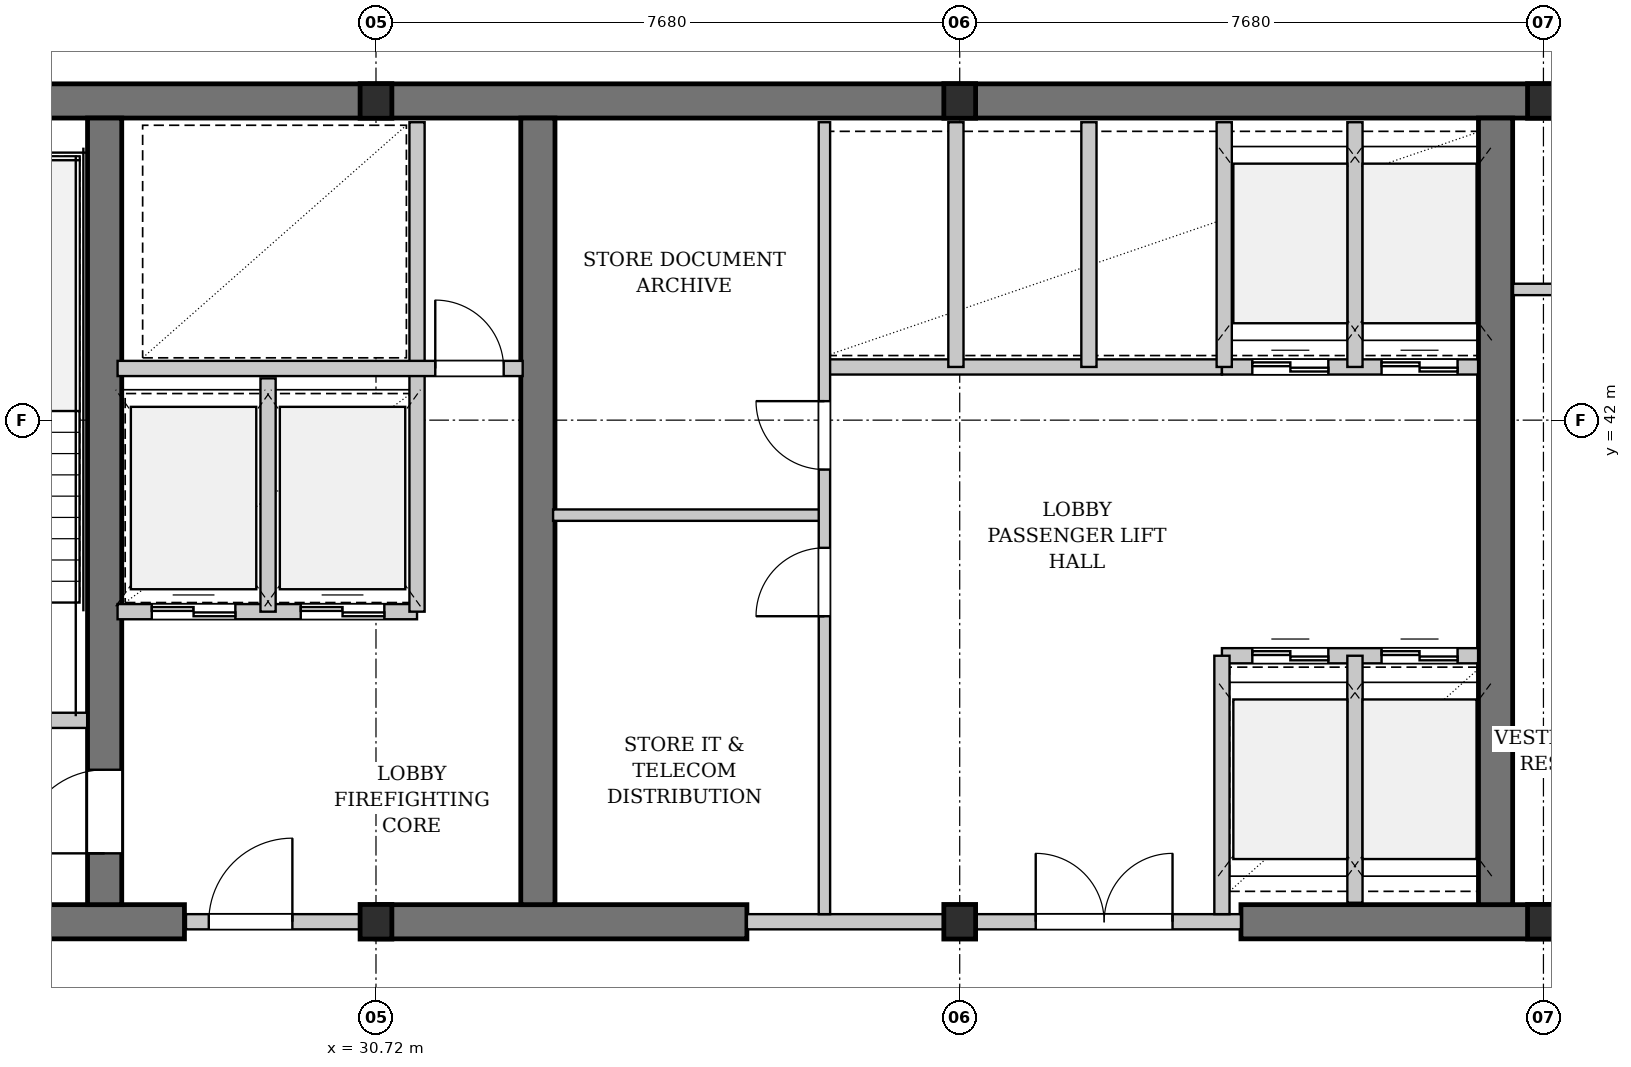
"""IFC4 building model, lengths in metres.
Left out: names, types, materials, properties, quantities, classifications, styles, units other than length and angle.
Written with IfcOpenShell. Run it as: python <this file> out.ifc"""

import sys

from ifc_helpers import new_model, si_unit, direction, frame, frame_2d, origin, origin_2d, place, context, subcontext, project, spatial, rectangle, i_section, extrude, element, fill, save


model = new_model("IFC4")
c1 = context("Model", 3, precision=1e-05, world=origin(), true_north=direction((0.0, 1.0)))
c2 = subcontext(c1, "Body", "Model", "MODEL_VIEW")
j1 = project(units=[si_unit("LENGTHUNIT", "METRE"), si_unit("PLANEANGLEUNIT", "RADIAN")], contexts=[c1])
p1 = place(None, origin())
s1 = spatial("IfcSite", under=j1, at=p1, CompositionType="ELEMENT")
p2 = place(p1, origin())
s2 = spatial("IfcBuilding", under=s1, at=p2, CompositionType="ELEMENT")
p3 = place(p2, frame((0.0, 0.0, 165.5)))
s3 = spatial("IfcBuildingStorey", under=s2, at=p3, CompositionType="ELEMENT", Elevation=165.5)
p4 = place(p3, frame((22.815, 46.2, 0.0), z_axis=(0.0, 0.0, 1.0), x_axis=(1.0, 0.0, 0.0)))
e1 = element("IfcWall", 1, at=p4, inside=s3, PredefinedType="SHEAR", context=c2, shape_type="SweptSolid", body=[
    extrude(rectangle(XDim=31.17, YDim=0.45, at=frame_2d((15.585, 0.0))), origin(), (0.0, 0.0, 1.0), 3.08),
])
p5 = place(p3, frame((22.815, 35.4, 0.0), z_axis=(0.0, 0.0, 1.0), x_axis=(1.0, 0.0, 0.0)))
e2 = element("IfcWall", 2, at=p5, inside=s3, PredefinedType="SHEAR", context=c2, shape_type="SweptSolid", body=[
    extrude(rectangle(XDim=5.385, YDim=0.45, at=frame_2d((2.692, 0.0))), origin(), (0.0, 0.0, 1.0), 3.08),
])
p6 = place(p3, frame((30.72, 35.4, 0.0), z_axis=(0.0, 0.0, 1.0), x_axis=(1.0, 0.0, 0.0)))
e3 = element("IfcWall", 3, at=p6, inside=s3, PredefinedType="SHEAR", context=c2, shape_type="SweptSolid", body=[
    extrude(rectangle(XDim=4.88, YDim=0.45, at=frame_2d((2.44, 0.0))), origin(), (0.0, 0.0, 1.0), 3.08),
])
p7 = place(p3, frame((42.1, 35.4, 0.0), z_axis=(0.0, 0.0, 1.0), x_axis=(1.0, 0.0, 0.0)))
e4 = element("IfcWall", 4, at=p7, inside=s3, PredefinedType="SHEAR", context=c2, shape_type="SweptSolid", body=[
    extrude(rectangle(XDim=8.05, YDim=0.45, at=frame_2d((4.025, 0.0))), origin(), (0.0, 0.0, 1.0), 3.08),
])
p8 = place(p7, frame((4.85, 0.0, 0.0)))
e5 = element("IfcOpeningElement", 5, at=p8, cuts=e4, PredefinedType="OPENING", context=c2, shape_type="SweptSolid", body=[
    extrude(rectangle(XDim=0.9, YDim=2.15, at=frame_2d((0.45, 1.075))), frame((0.0, 0.235, 0.0), z_axis=(0.0, -1.0, 0.0), x_axis=(1.0, 0.0, 0.0)), (0.0, 0.0, 1.0), 0.47),
])
p9 = place(p3, frame((27.15, 35.625, 0.0), z_axis=(0.0, 0.0, 1.0), x_axis=(0.0, 1.0, 0.0)))
e6 = element("IfcWall", 6, at=p9, inside=s3, PredefinedType="SHEAR", context=c2, shape_type="SweptSolid", body=[
    extrude(rectangle(XDim=10.35, YDim=0.45, at=frame_2d((5.175, 0.0))), origin(), (0.0, 0.0, 1.0), 3.08),
])
p10 = place(p9, frame((0.675, 0.0, 0.0)))
e7 = element("IfcOpeningElement", 7, at=p10, cuts=e6, PredefinedType="OPENING", context=c2, shape_type="SweptSolid", body=[
    extrude(rectangle(XDim=1.1, YDim=2.15, at=frame_2d((0.55, 1.075))), frame((0.0, 0.235, 0.0), z_axis=(0.0, -1.0, 0.0), x_axis=(1.0, 0.0, 0.0)), (0.0, 0.0, 1.0), 0.47),
])
for number, where, z_axis, x_axis in (
    (8, (32.85, 35.625, 0.0), (0.0, 0.0, 1.0), (0.0, 1.0, 0.0)),
    (9, (45.45, 35.625, 0.0), (0.0, 0.0, 1.0), (0.0, 1.0, 0.0)),
):
    element("IfcWall", number, at=place(p3, frame(where, z_axis=z_axis, x_axis=x_axis)), inside=s3, PredefinedType="SHEAR", context=c2, shape_type="SweptSolid", body=[
        extrude(rectangle(XDim=10.35, YDim=0.45, at=frame_2d((5.175, 0.0))), origin(), (0.0, 0.0, 1.0), 3.08),
    ])
for number, where, z_axis, x_axis in (
    (10, (30.72, 35.4, 0.0), (0.0, 0.0, 1.0), (1.0, 0.0, 0.0)),
    (11, (30.72, 46.2, 0.0), (0.0, 0.0, 1.0), (1.0, 0.0, 0.0)),
    (12, (38.4, 35.4, 0.0), (0.0, 0.0, 1.0), (1.0, 0.0, 0.0)),
    (13, (38.4, 46.2, 0.0), (0.0, 0.0, 1.0), (1.0, 0.0, 0.0)),
    (14, (46.08, 35.4, 0.0), (0.0, 0.0, 1.0), (1.0, 0.0, 0.0)),
    (15, (46.08, 46.2, 0.0), (0.0, 0.0, 1.0), (1.0, 0.0, 0.0)),
):
    element("IfcColumn", number, at=place(p3, frame(where, z_axis=z_axis, x_axis=x_axis)), inside=s3, PredefinedType="COLUMN", context=c2, shape_type="SweptSolid", body=[
        extrude(i_section(OverallWidth=0.418, OverallDepth=0.455, WebThickness=0.042, FlangeThickness=0.068, FilletRadius=0.015, at=origin_2d()), origin(), (0.0, 0.0, 1.0), 3.3),
    ])
p11 = place(p3, frame((23.3, 38.05, 0.0), z_axis=(0.0, 0.0, 1.0), x_axis=(1.0, 0.0, 0.0)))
e16 = element("IfcWall", 16, at=p11, inside=s3, PredefinedType="PARTITIONING", context=c2, shape_type="SweptSolid", body=[
    extrude(rectangle(XDim=3.62, YDim=0.2, at=frame_2d((1.81, 0.0))), origin(), (0.0, 0.0, 1.0), 3.08),
])
p12 = place(p11, frame((1.26, 0.0, 0.0)))
e17 = element("IfcOpeningElement", 17, at=p12, cuts=e16, PredefinedType="OPENING", context=c2, shape_type="SweptSolid", body=[
    extrude(rectangle(XDim=1.1, YDim=2.15, at=frame_2d((0.55, 1.075))), frame((0.0, 0.11, 0.0), z_axis=(0.0, -1.0, 0.0), x_axis=(1.0, 0.0, 0.0)), (0.0, 0.0, 1.0), 0.22),
])
p13 = place(p3, frame((28.22, 35.4, 0.0), z_axis=(0.0, 0.0, 1.0), x_axis=(1.0, 0.0, 0.0)))
e18 = element("IfcWall", 18, at=p13, inside=s3, PredefinedType="PARTITIONING", context=c2, shape_type="SweptSolid", body=[
    extrude(rectangle(XDim=2.5, YDim=0.2, at=frame_2d((1.25, 0.0))), origin(), (0.0, 0.0, 1.0), 2.475),
])
p14 = place(p13, frame((0.3, 0.0, 0.0)))
e19 = element("IfcOpeningElement", 19, at=p14, cuts=e18, PredefinedType="OPENING", context=c2, shape_type="SweptSolid", body=[
    extrude(rectangle(XDim=1.1, YDim=2.15, at=frame_2d((0.55, 1.075))), frame((0.0, 0.11, 0.0), z_axis=(0.0, -1.0, 0.0), x_axis=(1.0, 0.0, 0.0)), (0.0, 0.0, 1.0), 0.22),
])
p15 = place(p3, frame((27.32, 39.48, 0.0), z_axis=(0.0, 0.0, 1.0), x_axis=(1.0, 0.0, 0.0)))
e20 = element("IfcWall", 20, at=p15, inside=s3, PredefinedType="PARTITIONING", context=c2, shape_type="SweptSolid", body=[
    extrude(rectangle(XDim=3.94, YDim=0.2, at=frame_2d((1.97, 0.0))), origin(), (0.0, 0.0, 1.0), 3.08),
])
p16 = place(p15, frame((0.45, 0.0, 0.0)))
e21 = element("IfcOpeningElement", 21, at=p16, cuts=e20, PredefinedType="OPENING", context=c2, shape_type="SweptSolid", body=[
    extrude(rectangle(XDim=1.1, YDim=2.2, at=frame_2d((0.55, 1.1))), frame((0.0, 0.11, 0.0), z_axis=(0.0, -1.0, 0.0), x_axis=(1.0, 0.0, 0.0)), (0.0, 0.0, 1.0), 0.22),
])
p17 = place(p15, frame((2.41, 0.0, 0.0)))
e22 = element("IfcOpeningElement", 22, at=p17, cuts=e20, PredefinedType="OPENING", context=c2, shape_type="SweptSolid", body=[
    extrude(rectangle(XDim=1.1, YDim=2.2, at=frame_2d((0.55, 1.1))), frame((0.0, 0.11, 0.0), z_axis=(0.0, -1.0, 0.0), x_axis=(1.0, 0.0, 0.0)), (0.0, 0.0, 1.0), 0.22),
])
p18 = place(p3, frame((29.3, 39.48, 0.0), z_axis=(0.0, 0.0, 1.0), x_axis=(0.0, 1.0, 0.0)))
e23 = element("IfcWall", 23, at=p18, inside=s3, PredefinedType="PARTITIONING", context=c2, shape_type="SweptSolid", body=[
    extrude(rectangle(XDim=3.07, YDim=0.2, at=frame_2d((1.535, 0.0))), origin(), (0.0, 0.0, 1.0), 3.08),
])
p19 = place(p3, frame((31.26, 39.48, 0.0), z_axis=(0.0, 0.0, 1.0), x_axis=(0.0, 1.0, 0.0)))
e24 = element("IfcWall", 24, at=p19, inside=s3, PredefinedType="PARTITIONING", context=c2, shape_type="SweptSolid", body=[
    extrude(rectangle(XDim=6.44, YDim=0.2, at=frame_2d((3.22, 0.0))), origin(), (0.0, 0.0, 1.0), 3.08),
])
p20 = place(p3, frame((27.32, 42.68, 0.0), z_axis=(0.0, 0.0, 1.0), x_axis=(1.0, 0.0, 0.0)))
e25 = element("IfcWall", 25, at=p20, inside=s3, PredefinedType="PARTITIONING", context=c2, shape_type="SweptSolid", body=[
    extrude(rectangle(XDim=5.33, YDim=0.2, at=frame_2d((2.665, 0.0))), origin(), (0.0, 0.0, 1.0), 3.08),
])
p21 = place(p20, frame((4.18, 0.0, 0.0)))
e26 = element("IfcOpeningElement", 26, at=p21, cuts=e25, PredefinedType="OPENING", context=c2, shape_type="SweptSolid", body=[
    extrude(rectangle(XDim=0.9, YDim=2.15, at=frame_2d((0.45, 1.075))), frame((0.0, 0.11, 0.0), z_axis=(0.0, -1.0, 0.0), x_axis=(1.0, 0.0, 0.0)), (0.0, 0.0, 1.0), 0.22),
])
p22 = place(p3, frame((35.6, 35.4, 0.0), z_axis=(0.0, 0.0, 1.0), x_axis=(1.0, 0.0, 0.0)))
e27 = element("IfcWall", 27, at=p22, inside=s3, PredefinedType="PARTITIONING", context=c2, shape_type="SweptSolid", body=[
    extrude(rectangle(XDim=6.5, YDim=0.2, at=frame_2d((3.25, 0.0))), origin(), (0.0, 0.0, 1.0), 2.475),
])
p23 = place(p22, frame((3.8, 0.0, 0.0)))
e28 = element("IfcOpeningElement", 28, at=p23, cuts=e27, PredefinedType="OPENING", context=c2, shape_type="SweptSolid", body=[
    extrude(rectangle(XDim=1.8, YDim=2.3, at=frame_2d((0.9, 1.15))), frame((0.0, 0.11, 0.0), z_axis=(0.0, -1.0, 0.0), x_axis=(1.0, 0.0, 0.0)), (0.0, 0.0, 1.0), 0.22),
])
p24 = place(p3, frame((36.6, 42.7, 0.0), z_axis=(0.0, 0.0, 1.0), x_axis=(1.0, 0.0, 0.0)))
e29 = element("IfcWall", 29, at=p24, inside=s3, PredefinedType="PARTITIONING", context=c2, shape_type="SweptSolid", body=[
    extrude(rectangle(XDim=5.25, YDim=0.2, at=frame_2d((2.625, 0.0))), origin(), (0.0, 0.0, 1.0), 3.08),
])
p25 = place(p3, frame((38.35, 42.7, 0.0), z_axis=(0.0, 0.0, 1.0), x_axis=(0.0, 1.0, 0.0)))
e30 = element("IfcWall", 30, at=p25, inside=s3, PredefinedType="PARTITIONING", context=c2, shape_type="SweptSolid", body=[
    extrude(rectangle(XDim=3.22, YDim=0.2, at=frame_2d((1.61, 0.0))), origin(), (0.0, 0.0, 1.0), 2.475),
])
p26 = place(p3, frame((40.1, 42.7, 0.0), z_axis=(0.0, 0.0, 1.0), x_axis=(0.0, 1.0, 0.0)))
e31 = element("IfcWall", 31, at=p26, inside=s3, PredefinedType="PARTITIONING", context=c2, shape_type="SweptSolid", body=[
    extrude(rectangle(XDim=3.22, YDim=0.2, at=frame_2d((1.61, 0.0))), origin(), (0.0, 0.0, 1.0), 3.08),
])
p27 = place(p3, frame((33.05, 40.75, 0.0), z_axis=(0.0, 0.0, 1.0), x_axis=(1.0, 0.0, 0.0)))
e32 = element("IfcWall", 32, at=p27, inside=s3, PredefinedType="PARTITIONING", context=c2, shape_type="SweptSolid", body=[
    extrude(rectangle(XDim=3.57, YDim=0.15, at=frame_2d((1.785, 0.0))), origin(), (0.0, 0.0, 1.0), 3.08),
])
p28 = place(p3, frame((36.62, 35.5, 0.0), z_axis=(0.0, 0.0, 1.0), x_axis=(0.0, 1.0, 0.0)))
e33 = element("IfcWall", 33, at=p28, inside=s3, PredefinedType="PARTITIONING", context=c2, shape_type="SweptSolid", body=[
    extrude(rectangle(XDim=10.42, YDim=0.15, at=frame_2d((5.21, 0.0))), origin(), (0.0, 0.0, 1.0), 3.08),
])
p29 = place(p28, frame((3.92, 0.0, 0.0)))
e34 = element("IfcOpeningElement", 34, at=p29, cuts=e33, PredefinedType="OPENING", context=c2, shape_type="SweptSolid", body=[
    extrude(rectangle(XDim=0.9, YDim=2.15, at=frame_2d((0.45, 1.075))), frame((0.0, 0.085, 0.0), z_axis=(0.0, -1.0, 0.0), x_axis=(1.0, 0.0, 0.0)), (0.0, 0.0, 1.0), 0.17),
])
p30 = place(p28, frame((5.85, 0.0, 0.0)))
e35 = element("IfcOpeningElement", 35, at=p30, cuts=e33, PredefinedType="OPENING", context=c2, shape_type="SweptSolid", body=[
    extrude(rectangle(XDim=0.9, YDim=2.15, at=frame_2d((0.45, 1.075))), frame((0.0, 0.085, 0.0), z_axis=(0.0, -1.0, 0.0), x_axis=(1.0, 0.0, 0.0)), (0.0, 0.0, 1.0), 0.17),
])
p31 = place(p3, frame((41.85, 38.9, 0.0), z_axis=(0.0, 0.0, 1.0), x_axis=(1.0, 0.0, 0.0)))
e36 = element("IfcWall", 36, at=p31, inside=s3, PredefinedType="PARTITIONING", context=c2, shape_type="SweptSolid", body=[
    extrude(rectangle(XDim=3.37, YDim=0.2, at=frame_2d((1.685, 0.0))), origin(), (0.0, 0.0, 1.0), 3.08),
])
p32 = place(p31, frame((0.4, 0.0, 0.0)))
e37 = element("IfcOpeningElement", 37, at=p32, cuts=e36, PredefinedType="OPENING", context=c2, shape_type="SweptSolid", body=[
    extrude(rectangle(XDim=1.0, YDim=2.2, at=frame_2d((0.5, 1.1))), frame((0.0, 0.11, 0.0), z_axis=(0.0, -1.0, 0.0), x_axis=(1.0, 0.0, 0.0)), (0.0, 0.0, 1.0), 0.22),
])
p33 = place(p31, frame((2.1, 0.0, 0.0)))
e38 = element("IfcOpeningElement", 38, at=p33, cuts=e36, PredefinedType="OPENING", context=c2, shape_type="SweptSolid", body=[
    extrude(rectangle(XDim=1.0, YDim=2.2, at=frame_2d((0.5, 1.1))), frame((0.0, 0.11, 0.0), z_axis=(0.0, -1.0, 0.0), x_axis=(1.0, 0.0, 0.0)), (0.0, 0.0, 1.0), 0.22),
])
p34 = place(p3, frame((41.85, 42.7, 0.0), z_axis=(0.0, 0.0, 1.0), x_axis=(1.0, 0.0, 0.0)))
e39 = element("IfcWall", 39, at=p34, inside=s3, PredefinedType="PARTITIONING", context=c2, shape_type="SweptSolid", body=[
    extrude(rectangle(XDim=3.37, YDim=0.2, at=frame_2d((1.685, 0.0))), origin(), (0.0, 0.0, 1.0), 3.08),
])
p35 = place(p34, frame((0.4, 0.0, 0.0)))
e40 = element("IfcOpeningElement", 40, at=p35, cuts=e39, PredefinedType="OPENING", context=c2, shape_type="SweptSolid", body=[
    extrude(rectangle(XDim=1.0, YDim=2.2, at=frame_2d((0.5, 1.1))), frame((0.0, 0.11, 0.0), z_axis=(0.0, -1.0, 0.0), x_axis=(1.0, 0.0, 0.0)), (0.0, 0.0, 1.0), 0.22),
])
p36 = place(p34, frame((2.1, 0.0, 0.0)))
e41 = element("IfcOpeningElement", 41, at=p36, cuts=e39, PredefinedType="OPENING", context=c2, shape_type="SweptSolid", body=[
    extrude(rectangle(XDim=1.0, YDim=2.2, at=frame_2d((0.5, 1.1))), frame((0.0, 0.11, 0.0), z_axis=(0.0, -1.0, 0.0), x_axis=(1.0, 0.0, 0.0)), (0.0, 0.0, 1.0), 0.22),
])
p37 = place(p3, frame((43.6, 35.65, 0.0), z_axis=(0.0, 0.0, 1.0), x_axis=(0.0, 1.0, 0.0)))
e42 = element("IfcWall", 42, at=p37, inside=s3, PredefinedType="PARTITIONING", context=c2, shape_type="SweptSolid", body=[
    extrude(rectangle(XDim=3.25, YDim=0.2, at=frame_2d((1.625, 0.0))), origin(), (0.0, 0.0, 1.0), 3.08),
])
p38 = place(p3, frame((43.6, 42.7, 0.0), z_axis=(0.0, 0.0, 1.0), x_axis=(0.0, 1.0, 0.0)))
e43 = element("IfcWall", 43, at=p38, inside=s3, PredefinedType="PARTITIONING", context=c2, shape_type="SweptSolid", body=[
    extrude(rectangle(XDim=3.22, YDim=0.2, at=frame_2d((1.61, 0.0))), origin(), (0.0, 0.0, 1.0), 3.08),
])
p39 = place(p3, frame((41.85, 35.5, 0.0), z_axis=(0.0, 0.0, 1.0), x_axis=(0.0, 1.0, 0.0)))
e44 = element("IfcWall", 44, at=p39, inside=s3, PredefinedType="PARTITIONING", context=c2, shape_type="SweptSolid", body=[
    extrude(rectangle(XDim=3.4, YDim=0.2, at=frame_2d((1.7, 0.0))), origin(), (0.0, 0.0, 1.0), 3.08),
])
p40 = place(p3, frame((41.88, 42.7, 0.0), z_axis=(0.0, 0.0, 1.0), x_axis=(0.0, 1.0, 0.0)))
e45 = element("IfcWall", 45, at=p40, inside=s3, PredefinedType="PARTITIONING", context=c2, shape_type="SweptSolid", body=[
    extrude(rectangle(XDim=3.22, YDim=0.2, at=frame_2d((1.61, 0.0))), origin(), (0.0, 0.0, 1.0), 3.08),
])
p41 = place(p3, frame((45.68, 43.72, 0.0), z_axis=(0.0, 0.0, 1.0), x_axis=(1.0, 0.0, 0.0)))
e46 = element("IfcWall", 46, at=p41, inside=s3, PredefinedType="PARTITIONING", context=c2, shape_type="SweptSolid", body=[
    extrude(rectangle(XDim=4.5, YDim=0.15, at=frame_2d((2.25, 0.0))), origin(), (0.0, 0.0, 1.0), 3.08),
])
p42 = place(p41, frame((0.55, 0.0, 0.0)))
e47 = element("IfcOpeningElement", 47, at=p42, cuts=e46, PredefinedType="OPENING", context=c2, shape_type="SweptSolid", body=[
    extrude(rectangle(XDim=0.95, YDim=2.15, at=frame_2d((0.475, 1.075))), frame((0.0, 0.085, 0.0), z_axis=(0.0, -1.0, 0.0), x_axis=(1.0, 0.0, 0.0)), (0.0, 0.0, 1.0), 0.17),
])
p43 = place(p14, origin())
e48 = element("IfcDoor", 48, at=p43, inside=s3, OperationType="SINGLE_SWING_RIGHT", PredefinedType="DOOR", context=c2, shape_type="SweptSolid", body=[
    extrude(rectangle(XDim=1.1, YDim=2.15, at=frame_2d((0.55, 1.075))), frame((0.0, 0.025, 0.0), z_axis=(0.0, -1.0, 0.0), x_axis=(1.0, 0.0, 0.0)), (0.0, 0.0, 1.0), 0.05),
])
fill(e19, e48)
p44 = place(p16, origin())
e49 = element("IfcDoor", 49, at=p44, inside=s3, OperationType="DOUBLE_DOOR_SLIDING", PredefinedType="DOOR", context=c2, shape_type="SweptSolid", body=[
    extrude(rectangle(XDim=1.1, YDim=2.2, at=frame_2d((0.55, 1.1))), frame((0.0, 0.025, 0.0), z_axis=(0.0, -1.0, 0.0), x_axis=(1.0, 0.0, 0.0)), (0.0, 0.0, 1.0), 0.05),
])
fill(e21, e49)
p45 = place(p17, origin())
e50 = element("IfcDoor", 50, at=p45, inside=s3, OperationType="DOUBLE_DOOR_SLIDING", PredefinedType="DOOR", context=c2, shape_type="SweptSolid", body=[
    extrude(rectangle(XDim=1.1, YDim=2.2, at=frame_2d((0.55, 1.1))), frame((0.0, 0.025, 0.0), z_axis=(0.0, -1.0, 0.0), x_axis=(1.0, 0.0, 0.0)), (0.0, 0.0, 1.0), 0.05),
])
fill(e22, e50)
p46 = place(p21, origin())
e51 = element("IfcDoor", 51, at=p46, inside=s3, OperationType="SINGLE_SWING_LEFT", PredefinedType="DOOR", context=c2, shape_type="SweptSolid", body=[
    extrude(rectangle(XDim=0.9, YDim=2.15, at=frame_2d((0.45, 1.075))), frame((0.0, 0.025, 0.0), z_axis=(0.0, -1.0, 0.0), x_axis=(1.0, 0.0, 0.0)), (0.0, 0.0, 1.0), 0.05),
])
fill(e26, e51)
p47 = place(p23, origin())
e52 = element("IfcDoor", 52, at=p47, inside=s3, OperationType="DOUBLE_DOOR_SINGLE_SWING", PredefinedType="DOOR", context=c2, shape_type="SweptSolid", body=[
    extrude(rectangle(XDim=1.8, YDim=2.3, at=frame_2d((0.9, 1.15))), frame((0.0, 0.025, 0.0), z_axis=(0.0, -1.0, 0.0), x_axis=(1.0, 0.0, 0.0)), (0.0, 0.0, 1.0), 0.05),
])
fill(e28, e52)
p48 = place(p29, origin())
e53 = element("IfcDoor", 53, at=p48, inside=s3, OperationType="SINGLE_SWING_LEFT", PredefinedType="DOOR", context=c2, shape_type="SweptSolid", body=[
    extrude(rectangle(XDim=0.9, YDim=2.15, at=frame_2d((0.45, 1.075))), frame((0.0, 0.025, 0.0), z_axis=(0.0, -1.0, 0.0), x_axis=(1.0, 0.0, 0.0)), (0.0, 0.0, 1.0), 0.05),
])
fill(e34, e53)
p49 = place(p30, origin())
e54 = element("IfcDoor", 54, at=p49, inside=s3, OperationType="SINGLE_SWING_RIGHT", PredefinedType="DOOR", context=c2, shape_type="SweptSolid", body=[
    extrude(rectangle(XDim=0.9, YDim=2.15, at=frame_2d((0.45, 1.075))), frame((0.0, 0.025, 0.0), z_axis=(0.0, -1.0, 0.0), x_axis=(1.0, 0.0, 0.0)), (0.0, 0.0, 1.0), 0.05),
])
fill(e35, e54)
p50 = place(p32, origin())
e55 = element("IfcDoor", 55, at=p50, inside=s3, OperationType="DOUBLE_DOOR_SLIDING", PredefinedType="DOOR", context=c2, shape_type="SweptSolid", body=[
    extrude(rectangle(XDim=1.0, YDim=2.2, at=frame_2d((0.5, 1.1))), frame((0.0, 0.025, 0.0), z_axis=(0.0, -1.0, 0.0), x_axis=(1.0, 0.0, 0.0)), (0.0, 0.0, 1.0), 0.05),
])
fill(e37, e55)
p51 = place(p33, origin())
e56 = element("IfcDoor", 56, at=p51, inside=s3, OperationType="DOUBLE_DOOR_SLIDING", PredefinedType="DOOR", context=c2, shape_type="SweptSolid", body=[
    extrude(rectangle(XDim=1.0, YDim=2.2, at=frame_2d((0.5, 1.1))), frame((0.0, 0.025, 0.0), z_axis=(0.0, -1.0, 0.0), x_axis=(1.0, 0.0, 0.0)), (0.0, 0.0, 1.0), 0.05),
])
fill(e38, e56)
p52 = place(p35, origin())
e57 = element("IfcDoor", 57, at=p52, inside=s3, OperationType="DOUBLE_DOOR_SLIDING", PredefinedType="DOOR", context=c2, shape_type="SweptSolid", body=[
    extrude(rectangle(XDim=1.0, YDim=2.2, at=frame_2d((0.5, 1.1))), frame((0.0, 0.025, 0.0), z_axis=(0.0, -1.0, 0.0), x_axis=(1.0, 0.0, 0.0)), (0.0, 0.0, 1.0), 0.05),
])
fill(e40, e57)
p53 = place(p36, origin())
e58 = element("IfcDoor", 58, at=p53, inside=s3, OperationType="DOUBLE_DOOR_SLIDING", PredefinedType="DOOR", context=c2, shape_type="SweptSolid", body=[
    extrude(rectangle(XDim=1.0, YDim=2.2, at=frame_2d((0.5, 1.1))), frame((0.0, 0.025, 0.0), z_axis=(0.0, -1.0, 0.0), x_axis=(1.0, 0.0, 0.0)), (0.0, 0.0, 1.0), 0.05),
])
fill(e41, e58)
p54 = place(p10, origin())
e59 = element("IfcDoor", 59, at=p54, inside=s3, OperationType="SINGLE_SWING_LEFT", PredefinedType="DOOR", context=c2, shape_type="SweptSolid", body=[
    extrude(rectangle(XDim=1.1, YDim=2.15, at=frame_2d((0.55, 1.075))), frame((0.0, 0.025, 0.0), z_axis=(0.0, -1.0, 0.0), x_axis=(1.0, 0.0, 0.0)), (0.0, 0.0, 1.0), 0.05),
])
fill(e7, e59)
save(model, sys.argv[1])
